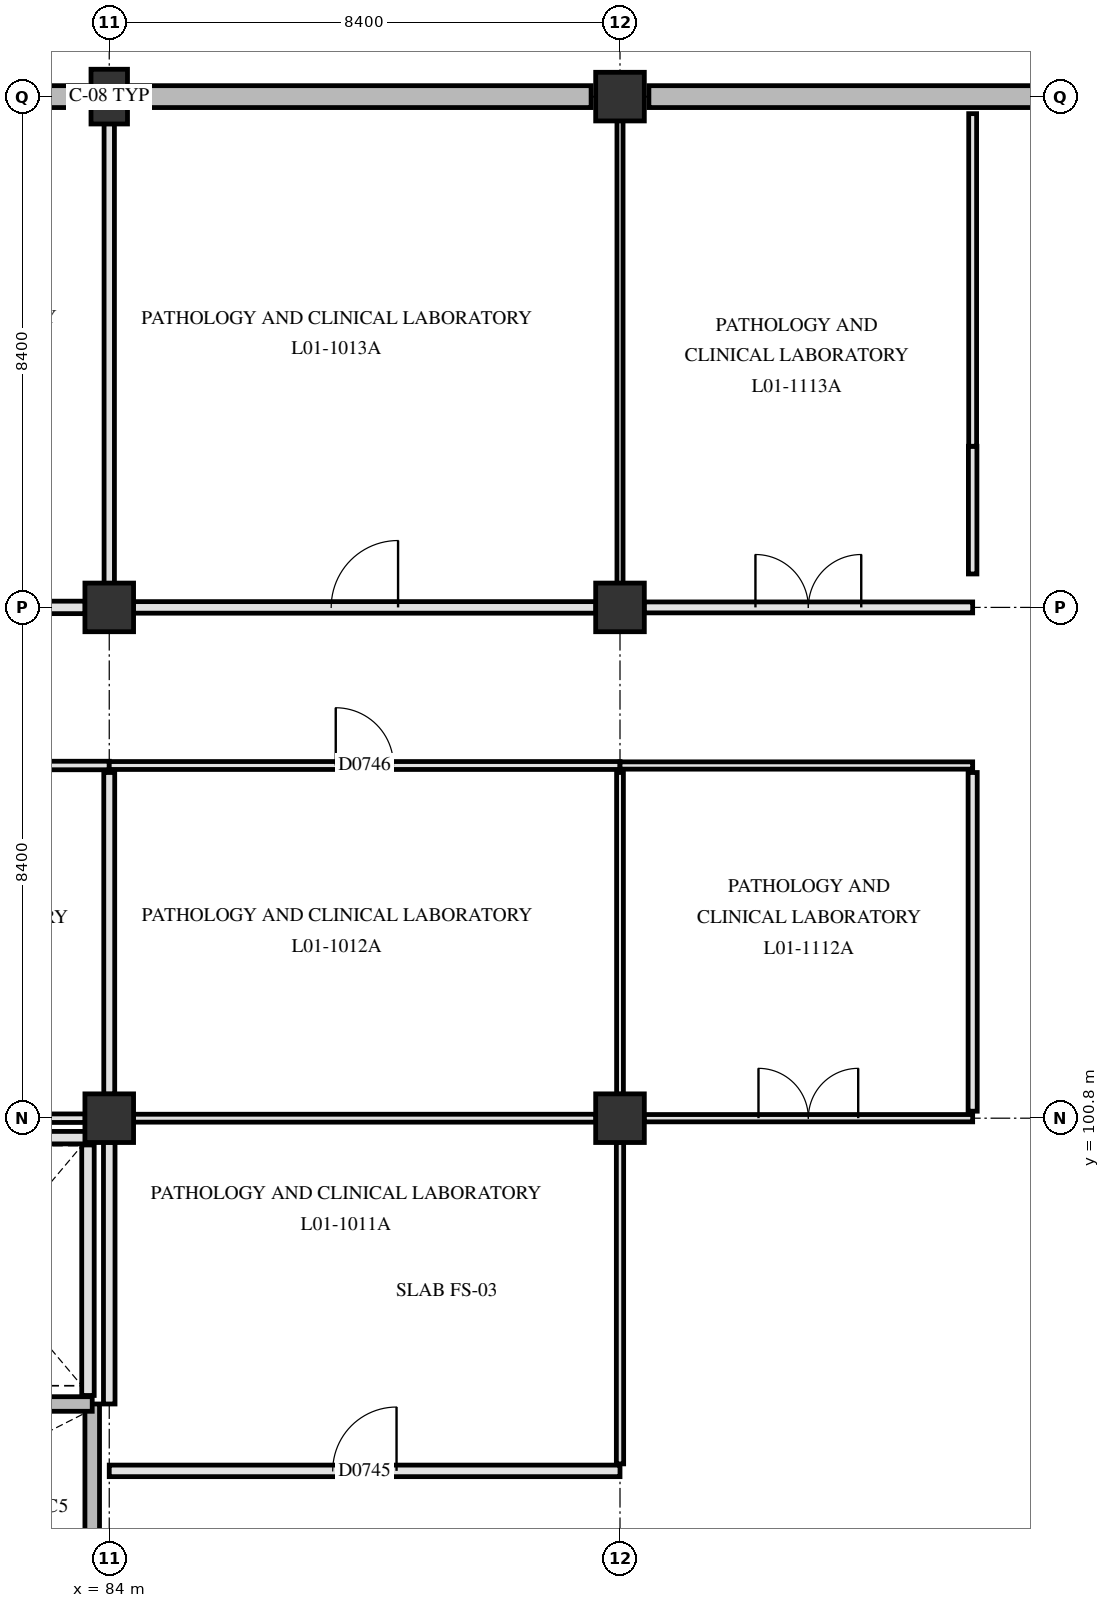
"""IFC4 building model, lengths in metres.
Left out: names, types, materials, properties, quantities, classifications, styles, units other than length and angle.
Written with IfcOpenShell. Run it as: python <this file> out.ifc"""

import sys

from ifc_helpers import new_model, si_unit, direction, frame, frame_2d, origin, origin_2d, place, context, subcontext, project, spatial, rectangle, extrude, element, fill, save


model = new_model("IFC4")
c1 = context("Model", 3, precision=1e-05, world=origin(), true_north=direction((0.0, 1.0)))
c2 = subcontext(c1, "Body", "Model", "MODEL_VIEW")
j1 = project(units=[si_unit("LENGTHUNIT", "METRE"), si_unit("PLANEANGLEUNIT", "RADIAN")], contexts=[c1])
p1 = place(None, origin())
s1 = spatial("IfcSite", under=j1, at=p1, CompositionType="ELEMENT")
p2 = place(p1, origin())
s2 = spatial("IfcBuilding", under=s1, at=p2, CompositionType="ELEMENT")
p3 = place(p2, frame((0.0, 0.0, 4.8)))
s3 = spatial("IfcBuildingStorey", under=s2, at=p3, CompositionType="ELEMENT", Elevation=4.8)
for number, where, z_axis, x_axis in (
    (1, (84.0, 100.8, 0.0), (0.0, 0.0, 1.0), (1.0, 0.0, 0.0)),
    (2, (84.0, 109.2, 0.0), (0.0, 0.0, 1.0), (1.0, 0.0, 0.0)),
):
    element("IfcColumn", number, at=place(p3, frame(where, z_axis=z_axis, x_axis=x_axis)), inside=s3, PredefinedType="COLUMN", context=c2, shape_type="SweptSolid", body=[
        extrude(rectangle(XDim=0.8, YDim=0.8, at=origin_2d()), origin(), (0.0, 0.0, 1.0), 4.5),
    ])
p4 = place(p3, frame((84.0, 117.6, 0.0), z_axis=(0.0, 0.0, 1.0), x_axis=(1.0, 0.0, 0.0)))
e3 = element("IfcColumn", 3, at=p4, inside=s3, PredefinedType="PILASTER", context=c2, shape_type="SweptSolid", body=[
    extrude(rectangle(XDim=0.6, YDim=0.9, at=origin_2d()), origin(), (0.0, 0.0, 1.0), 4.5),
])
for number, where, z_axis, x_axis in (
    (4, (92.4, 100.8, 0.0), (0.0, 0.0, 1.0), (1.0, 0.0, 0.0)),
    (5, (92.4, 109.2, 0.0), (0.0, 0.0, 1.0), (1.0, 0.0, 0.0)),
    (6, (92.4, 117.6, 0.0), (0.0, 0.0, 1.0), (1.0, 0.0, 0.0)),
):
    element("IfcColumn", number, at=place(p3, frame(where, z_axis=z_axis, x_axis=x_axis)), inside=s3, PredefinedType="COLUMN", context=c2, shape_type="SweptSolid", body=[
        extrude(rectangle(XDim=0.8, YDim=0.8, at=origin_2d()), origin(), (0.0, 0.0, 1.0), 4.5),
    ])
for number, where, z_axis, x_axis in (
    (7, (76.075, 117.6, 0.0), (0.0, 0.0, 1.0), (1.0, 0.0, 0.0)),
    (8, (84.375, 117.6, 0.0), (0.0, 0.0, 1.0), (1.0, 0.0, 0.0)),
):
    element("IfcWall", number, at=place(p3, frame(where, z_axis=z_axis, x_axis=x_axis)), inside=s3, PredefinedType="SOLIDWALL", context=c2, shape_type="SweptSolid", body=[
        extrude(rectangle(XDim=7.55, YDim=0.36, at=frame_2d((3.775, 0.0))), origin(), (0.0, 0.0, 1.0), 4.15),
    ])
p5 = place(p3, frame((92.875, 117.6, 0.0), z_axis=(0.0, 0.0, 1.0), x_axis=(1.0, 0.0, 0.0)))
e9 = element("IfcWall", 9, at=p5, inside=s3, PredefinedType="SOLIDWALL", context=c2, shape_type="SweptSolid", body=[
    extrude(rectangle(XDim=7.45, YDim=0.36, at=frame_2d((3.725, 0.0))), origin(), (0.0, 0.0, 1.0), 4.15),
])
p6 = place(p3, frame((83.72, 92.78, 0.0), z_axis=(0.0, 0.0, 1.0), x_axis=(0.0, 1.0, 0.0)))
e10 = element("IfcWall", 10, at=p6, inside=s3, PredefinedType="SHEAR", context=c2, shape_type="SweptSolid", body=[
    extrude(rectangle(XDim=3.32, YDim=0.24, at=frame_2d((1.66, 0.0))), origin(), (0.0, 0.0, 1.0), 4.15),
])
p7 = place(p3, frame((75.9, 96.1, 0.0), z_axis=(0.0, 0.0, 1.0), x_axis=(1.0, 0.0, 0.0)))
e11 = element("IfcWall", 11, at=p7, inside=s3, PredefinedType="SHEAR", context=c2, shape_type="SweptSolid", body=[
    extrude(rectangle(XDim=7.82, YDim=0.24, at=frame_2d((3.91, 0.0))), origin(), (0.0, 0.0, 1.0), 4.15),
])
p8 = place(p7, frame((0.25, 0.0, 0.0)))
e12 = element("IfcOpeningElement", 12, at=p8, cuts=e11, PredefinedType="OPENING", context=c2, shape_type="SweptSolid", body=[
    extrude(rectangle(XDim=1.45, YDim=2.2, at=frame_2d((0.725, 1.1))), frame((0.0, 0.13, 0.0), z_axis=(0.0, -1.0, 0.0), x_axis=(1.0, 0.0, 0.0)), (0.0, 0.0, 1.0), 0.26),
])
p9 = place(p3, frame((83.65, 96.24, 0.0), z_axis=(0.0, 0.0, 1.0), x_axis=(0.0, 1.0, 0.0)))
e13 = element("IfcWall", 13, at=p9, inside=s3, PredefinedType="PARTITIONING", context=c2, shape_type="SweptSolid", body=[
    extrude(rectangle(XDim=4.12, YDim=0.205, at=frame_2d((2.06, 0.0))), origin(), (0.0, 0.0, 1.0), 4.14),
])
p10 = place(p3, frame((80.08, 100.48, 0.0), z_axis=(0.0, 0.0, 1.0), x_axis=(1.0, 0.0, 0.0)))
e14 = element("IfcWall", 14, at=p10, inside=s3, PredefinedType="PARTITIONING", context=c2, shape_type="SweptSolid", body=[
    extrude(rectangle(XDim=3.57, YDim=0.205, at=frame_2d((1.785, 0.0))), origin(), (0.0, 0.0, 1.0), 3.54),
])
p11 = place(p3, frame((84.0, 95.0, 0.0), z_axis=(0.0, 0.0, 1.0), x_axis=(1.0, 0.0, 0.0)))
e15 = element("IfcWall", 15, at=p11, inside=s3, PredefinedType="PARTITIONING", context=c2, shape_type="SweptSolid", body=[
    extrude(rectangle(XDim=8.4, YDim=0.19, at=frame_2d((4.2, 0.0))), origin(), (0.0, 0.0, 1.0), 3.59),
])
p12 = place(p11, frame((3.675, 0.0, 0.0)))
e16 = element("IfcOpeningElement", 16, at=p12, cuts=e15, PredefinedType="OPENING", context=c2, shape_type="SweptSolid", body=[
    extrude(rectangle(XDim=1.05, YDim=2.15, at=frame_2d((0.525, 1.075))), frame((0.0, 0.105, 0.0), z_axis=(0.0, -1.0, 0.0), x_axis=(1.0, 0.0, 0.0)), (0.0, 0.0, 1.0), 0.21),
])
p13 = place(p3, frame((78.95, 100.8, 0.0), z_axis=(0.0, 0.0, 1.0), x_axis=(1.0, 0.0, 0.0)))
e17 = element("IfcWall", 17, at=p13, inside=s3, PredefinedType="PARTITIONING", context=c2, shape_type="SweptSolid", body=[
    extrude(rectangle(XDim=4.655, YDim=0.14, at=frame_2d((2.328, 0.0))), origin(), (0.0, 0.0, 1.0), 3.54),
])
p14 = place(p3, frame((84.395, 100.8, 0.0), z_axis=(0.0, 0.0, 1.0), x_axis=(1.0, 0.0, 0.0)))
e18 = element("IfcWall", 18, at=p14, inside=s3, PredefinedType="PARTITIONING", context=c2, shape_type="SweptSolid", body=[
    extrude(rectangle(XDim=7.61, YDim=0.13, at=frame_2d((3.805, 0.0))), origin(), (0.0, 0.0, 1.0), 3.54),
])
p15 = place(p3, frame((92.795, 100.8, 0.0), z_axis=(0.0, 0.0, 1.0), x_axis=(1.0, 0.0, 0.0)))
e19 = element("IfcWall", 19, at=p15, inside=s3, PredefinedType="PARTITIONING", context=c2, shape_type="SweptSolid", body=[
    extrude(rectangle(XDim=5.405, YDim=0.12, at=frame_2d((2.703, 0.0))), origin(), (0.0, 0.0, 1.0), 3.54),
])
p16 = place(p15, frame((1.883, 0.0, 0.0)))
e20 = element("IfcOpeningElement", 20, at=p16, cuts=e19, PredefinedType="OPENING", context=c2, shape_type="SweptSolid", body=[
    extrude(rectangle(XDim=1.64, YDim=2.28, at=frame_2d((0.82, 1.14))), frame((0.0, 0.07, 0.0), z_axis=(0.0, -1.0, 0.0), x_axis=(1.0, 0.0, 0.0)), (0.0, 0.0, 1.0), 0.14),
])
p17 = place(p3, frame((75.6, 106.6, 0.0), z_axis=(0.0, 0.0, 1.0), x_axis=(1.0, 0.0, 0.0)))
e21 = element("IfcWall", 21, at=p17, inside=s3, PredefinedType="PARTITIONING", context=c2, shape_type="SweptSolid", body=[
    extrude(rectangle(XDim=8.4, YDim=0.14, at=frame_2d((4.2, 0.0))), origin(), (0.0, 0.0, 1.0), 3.59),
])
p18 = place(p17, frame((3.475, 0.0, 0.0)))
e22 = element("IfcOpeningElement", 22, at=p18, cuts=e21, PredefinedType="OPENING", context=c2, shape_type="SweptSolid", body=[
    extrude(rectangle(XDim=1.45, YDim=2.2, at=frame_2d((0.725, 1.1))), frame((0.0, 0.08, 0.0), z_axis=(0.0, -1.0, 0.0), x_axis=(1.0, 0.0, 0.0)), (0.0, 0.0, 1.0), 0.16),
])
p19 = place(p3, frame((84.0, 106.6, 0.0), z_axis=(0.0, 0.0, 1.0), x_axis=(1.0, 0.0, 0.0)))
e23 = element("IfcWall", 23, at=p19, inside=s3, PredefinedType="PARTITIONING", context=c2, shape_type="SweptSolid", body=[
    extrude(rectangle(XDim=8.4, YDim=0.13, at=frame_2d((4.2, 0.0))), origin(), (0.0, 0.0, 1.0), 3.59),
])
p20 = place(p19, frame((3.725, 0.0, 0.0)))
e24 = element("IfcOpeningElement", 24, at=p20, cuts=e23, PredefinedType="OPENING", context=c2, shape_type="SweptSolid", body=[
    extrude(rectangle(XDim=0.95, YDim=2.1, at=frame_2d((0.475, 1.05))), frame((0.0, 0.075, 0.0), z_axis=(0.0, -1.0, 0.0), x_axis=(1.0, 0.0, 0.0)), (0.0, 0.0, 1.0), 0.15),
])
p21 = place(p3, frame((92.4, 106.6, 0.0), z_axis=(0.0, 0.0, 1.0), x_axis=(1.0, 0.0, 0.0)))
e25 = element("IfcWall", 25, at=p21, inside=s3, PredefinedType="PARTITIONING", context=c2, shape_type="SweptSolid", body=[
    extrude(rectangle(XDim=5.8, YDim=0.12, at=frame_2d((2.9, 0.0))), origin(), (0.0, 0.0, 1.0), 3.59),
])
p22 = place(p3, frame((75.995, 109.2, 0.0), z_axis=(0.0, 0.0, 1.0), x_axis=(1.0, 0.0, 0.0)))
e26 = element("IfcWall", 26, at=p22, inside=s3, PredefinedType="PARTITIONING", context=c2, shape_type="SweptSolid", body=[
    extrude(rectangle(XDim=7.61, YDim=0.205, at=frame_2d((3.805, 0.0))), origin(), (0.0, 0.0, 1.0), 3.54),
])
p23 = place(p22, frame((3.005, 0.0, 0.0)))
e27 = element("IfcOpeningElement", 27, at=p23, cuts=e26, PredefinedType="OPENING", context=c2, shape_type="SweptSolid", body=[
    extrude(rectangle(XDim=1.6, YDim=2.25, at=frame_2d((0.8, 1.125))), frame((0.0, 0.113, 0.0), z_axis=(0.0, -1.0, 0.0), x_axis=(1.0, 0.0, 0.0)), (0.0, 0.0, 1.0), 0.225),
])
p24 = place(p3, frame((84.395, 109.2, 0.0), z_axis=(0.0, 0.0, 1.0), x_axis=(1.0, 0.0, 0.0)))
e28 = element("IfcWall", 28, at=p24, inside=s3, PredefinedType="PARTITIONING", context=c2, shape_type="SweptSolid", body=[
    extrude(rectangle(XDim=7.61, YDim=0.19, at=frame_2d((3.805, 0.0))), origin(), (0.0, 0.0, 1.0), 3.54),
])
p25 = place(p24, frame((3.255, 0.0, 0.0)))
e29 = element("IfcOpeningElement", 29, at=p25, cuts=e28, PredefinedType="OPENING", context=c2, shape_type="SweptSolid", body=[
    extrude(rectangle(XDim=1.1, YDim=2.15, at=frame_2d((0.55, 1.075))), frame((0.0, 0.105, 0.0), z_axis=(0.0, -1.0, 0.0), x_axis=(1.0, 0.0, 0.0)), (0.0, 0.0, 1.0), 0.21),
])
p26 = place(p3, frame((92.795, 109.2, 0.0), z_axis=(0.0, 0.0, 1.0), x_axis=(1.0, 0.0, 0.0)))
e30 = element("IfcWall", 30, at=p26, inside=s3, PredefinedType="PARTITIONING", context=c2, shape_type="SweptSolid", body=[
    extrude(rectangle(XDim=5.405, YDim=0.18, at=frame_2d((2.703, 0.0))), origin(), (0.0, 0.0, 1.0), 3.54),
])
p27 = place(p26, frame((1.833, 0.0, 0.0)))
e31 = element("IfcOpeningElement", 31, at=p27, cuts=e30, PredefinedType="OPENING", context=c2, shape_type="SweptSolid", body=[
    extrude(rectangle(XDim=1.74, YDim=2.24, at=frame_2d((0.87, 1.12))), frame((0.0, 0.1, 0.0), z_axis=(0.0, -1.0, 0.0), x_axis=(1.0, 0.0, 0.0)), (0.0, 0.0, 1.0), 0.2),
])
p28 = place(p3, frame((84.0, 96.1, 0.0), z_axis=(0.0, 0.0, 1.0), x_axis=(0.0, 1.0, 0.0)))
e32 = element("IfcWall", 32, at=p28, inside=s3, PredefinedType="PARTITIONING", context=c2, shape_type="SweptSolid", body=[
    extrude(rectangle(XDim=4.305, YDim=0.19, at=frame_2d((2.152, 0.0))), origin(), (0.0, 0.0, 1.0), 3.59),
])
p29 = place(p3, frame((84.0, 101.195, 0.0), z_axis=(0.0, 0.0, 1.0), x_axis=(0.0, 1.0, 0.0)))
e33 = element("IfcWall", 33, at=p29, inside=s3, PredefinedType="PARTITIONING", context=c2, shape_type="SweptSolid", body=[
    extrude(rectangle(XDim=5.29, YDim=0.18, at=frame_2d((2.645, 0.0))), origin(), (0.0, 0.0, 1.0), 3.59),
])
p30 = place(p3, frame((84.0, 109.595, 0.0), z_axis=(0.0, 0.0, 1.0), x_axis=(0.0, 1.0, 0.0)))
e34 = element("IfcWall", 34, at=p30, inside=s3, PredefinedType="PARTITIONING", context=c2, shape_type="SweptSolid", body=[
    extrude(rectangle(XDim=7.56, YDim=0.17, at=frame_2d((3.78, 0.0))), origin(), (0.0, 0.0, 1.0), 3.59),
])
p31 = place(p3, frame((92.4, 95.115, 0.0), z_axis=(0.0, 0.0, 1.0), x_axis=(0.0, 1.0, 0.0)))
e35 = element("IfcWall", 35, at=p31, inside=s3, PredefinedType="PARTITIONING", context=c2, shape_type="SweptSolid", body=[
    extrude(rectangle(XDim=5.29, YDim=0.12, at=frame_2d((2.645, 0.0))), origin(), (0.0, 0.0, 1.0), 3.59),
])
p32 = place(p3, frame((92.4, 101.195, 0.0), z_axis=(0.0, 0.0, 1.0), x_axis=(0.0, 1.0, 0.0)))
e36 = element("IfcWall", 36, at=p32, inside=s3, PredefinedType="PARTITIONING", context=c2, shape_type="SweptSolid", body=[
    extrude(rectangle(XDim=5.29, YDim=0.112, at=frame_2d((2.645, 0.0))), origin(), (0.0, 0.0, 1.0), 3.59),
])
p33 = place(p3, frame((92.4, 109.595, 0.0), z_axis=(0.0, 0.0, 1.0), x_axis=(0.0, 1.0, 0.0)))
e37 = element("IfcWall", 37, at=p33, inside=s3, PredefinedType="PARTITIONING", context=c2, shape_type="SweptSolid", body=[
    extrude(rectangle(XDim=7.61, YDim=0.1, at=frame_2d((3.805, 0.0))), origin(), (0.0, 0.0, 1.0), 3.59),
])
p34 = place(p3, frame((98.2, 100.915, 0.0), z_axis=(0.0, 0.0, 1.0), x_axis=(0.0, 1.0, 0.0)))
e38 = element("IfcWall", 38, at=p34, inside=s3, PredefinedType="PARTITIONING", context=c2, shape_type="SweptSolid", body=[
    extrude(rectangle(XDim=5.57, YDim=0.15, at=frame_2d((2.785, 0.0))), origin(), (0.0, 0.0, 1.0), 3.54),
])
p35 = place(p3, frame((98.2, 109.75, 0.0), z_axis=(0.0, 0.0, 1.0), x_axis=(0.0, 1.0, 0.0)))
e39 = element("IfcWall", 39, at=p35, inside=s3, PredefinedType="PARTITIONING", context=c2, shape_type="SweptSolid", body=[
    extrude(rectangle(XDim=2.1, YDim=0.14, at=frame_2d((1.05, 0.0))), origin(), (0.0, 0.0, 1.0), 4.14),
])
p36 = place(p3, frame((98.2, 111.85, 0.0), z_axis=(0.0, 0.0, 1.0), x_axis=(0.0, 1.0, 0.0)))
e40 = element("IfcWall", 40, at=p36, inside=s3, PredefinedType="PARTITIONING", context=c2, shape_type="SweptSolid", body=[
    extrude(rectangle(XDim=5.47, YDim=0.13, at=frame_2d((2.735, 0.0))), origin(), (0.0, 0.0, 1.0), 4.14),
])
p37 = place(p12, origin())
e41 = element("IfcDoor", 41, at=p37, inside=s3, OperationType="SINGLE_SWING_RIGHT", PredefinedType="DOOR", context=c2, shape_type="SweptSolid", body=[
    extrude(rectangle(XDim=1.05, YDim=2.15, at=frame_2d((0.525, 1.075))), frame((0.0, 0.025, 0.0), z_axis=(0.0, -1.0, 0.0), x_axis=(1.0, 0.0, 0.0)), (0.0, 0.0, 1.0), 0.05),
])
fill(e16, e41)
p38 = place(p20, origin())
e42 = element("IfcDoor", 42, at=p38, inside=s3, OperationType="SINGLE_SWING_LEFT", PredefinedType="DOOR", context=c2, shape_type="SweptSolid", body=[
    extrude(rectangle(XDim=0.95, YDim=2.1, at=frame_2d((0.475, 1.05))), frame((0.0, 0.025, 0.0), z_axis=(0.0, -1.0, 0.0), x_axis=(1.0, 0.0, 0.0)), (0.0, 0.0, 1.0), 0.05),
])
fill(e24, e42)
p39 = place(p25, origin())
e43 = element("IfcDoor", 43, at=p39, inside=s3, OperationType="SINGLE_SWING_RIGHT", PredefinedType="DOOR", context=c2, shape_type="SweptSolid", body=[
    extrude(rectangle(XDim=1.1, YDim=2.15, at=frame_2d((0.55, 1.075))), frame((0.0, 0.025, 0.0), z_axis=(0.0, -1.0, 0.0), x_axis=(1.0, 0.0, 0.0)), (0.0, 0.0, 1.0), 0.05),
])
fill(e29, e43)
p40 = place(p16, origin())
e44 = element("IfcDoor", 44, at=p40, inside=s3, OperationType="DOUBLE_SWING_LEFT", PredefinedType="DOOR", context=c2, shape_type="SweptSolid", body=[
    extrude(rectangle(XDim=1.64, YDim=2.28, at=frame_2d((0.82, 1.14))), frame((0.0, 0.025, 0.0), z_axis=(0.0, -1.0, 0.0), x_axis=(1.0, 0.0, 0.0)), (0.0, 0.0, 1.0), 0.05),
])
fill(e20, e44)
p41 = place(p27, origin())
e45 = element("IfcDoor", 45, at=p41, inside=s3, OperationType="DOUBLE_SWING_RIGHT", PredefinedType="DOOR", context=c2, shape_type="SweptSolid", body=[
    extrude(rectangle(XDim=1.74, YDim=2.24, at=frame_2d((0.87, 1.12))), frame((0.0, 0.025, 0.0), z_axis=(0.0, -1.0, 0.0), x_axis=(1.0, 0.0, 0.0)), (0.0, 0.0, 1.0), 0.05),
])
fill(e31, e45)
save(model, sys.argv[1])
